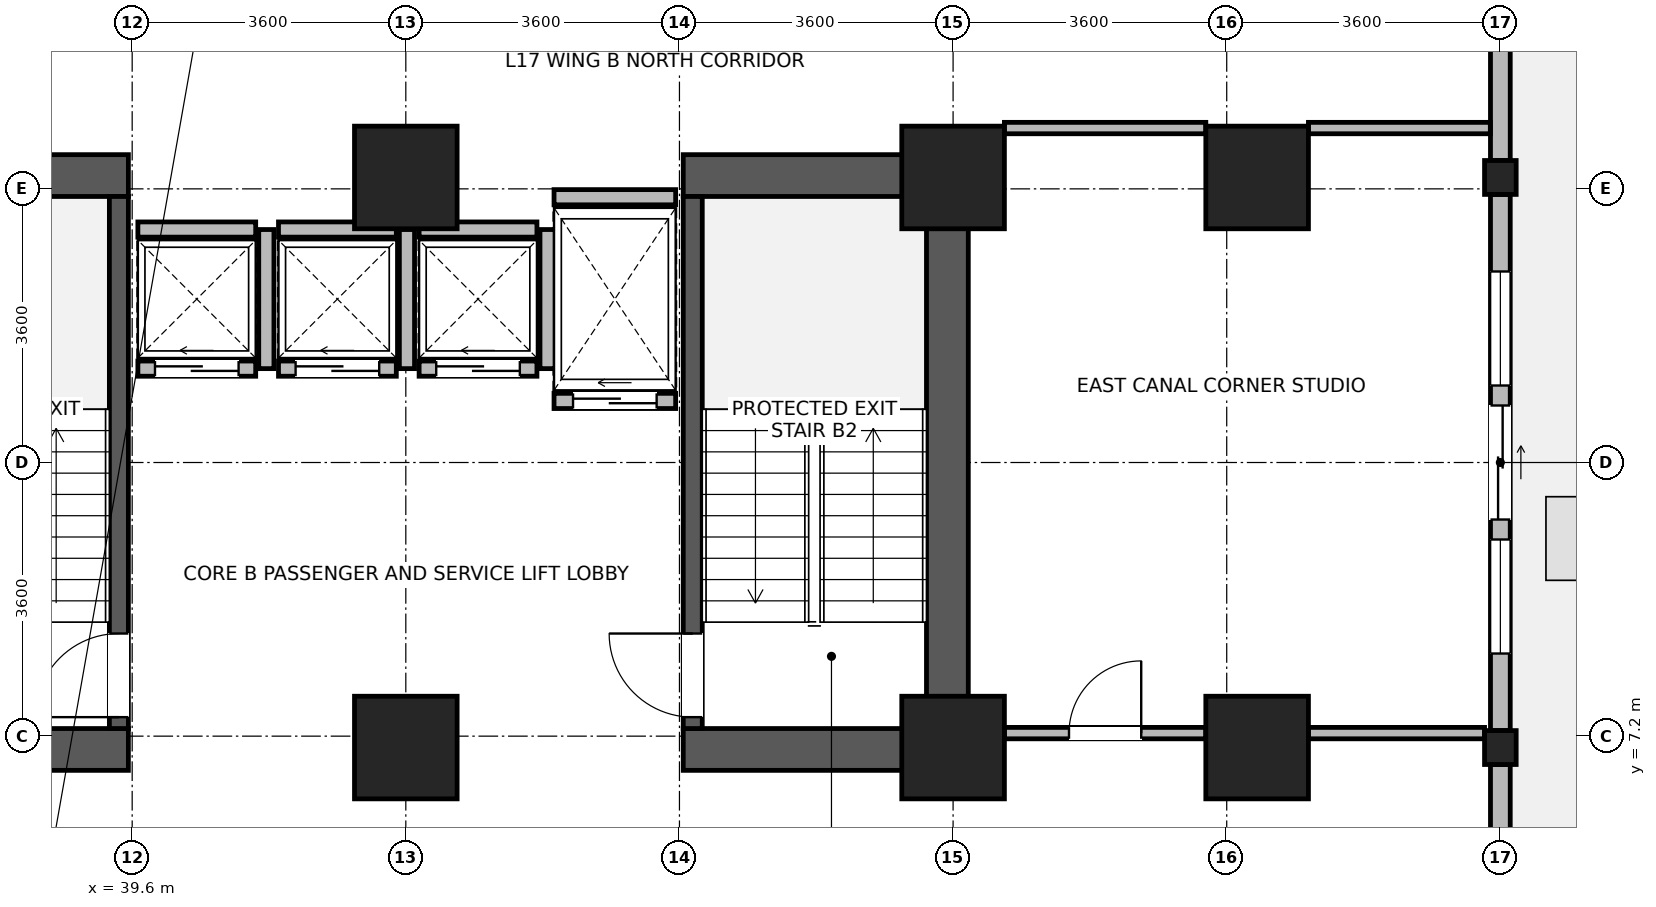
"""IFC4 building model, lengths in metres.
Left out: names, types, materials, properties, quantities, classifications, styles, units other than length and angle.
Written with IfcOpenShell. Run it as: python <this file> out.ifc"""

import sys

from ifc_helpers import new_model, si_unit, direction, frame, frame_2d, origin, origin_2d, place, context, subcontext, project, spatial, rectangle, i_section, extrude, source, transform, mapped, element, fill, save


model = new_model("IFC4")
c1 = context("Model", 3, precision=1e-05, world=origin(), true_north=direction((0.0, 1.0)))
c2 = subcontext(c1, "Body", "Model", "MODEL_VIEW")
j1 = project(units=[si_unit("LENGTHUNIT", "METRE"), si_unit("PLANEANGLEUNIT", "RADIAN")], contexts=[c1])
p1 = place(None, origin())
s1 = spatial("IfcSite", under=j1, at=p1, CompositionType="ELEMENT")
p2 = place(p1, origin())
s2 = spatial("IfcBuilding", under=s1, at=p2, CompositionType="ELEMENT")
p3 = place(p2, frame((0.0, 0.0, 69.7)))
s3 = spatial("IfcBuildingStorey", under=s2, at=p3, CompositionType="ELEMENT", Elevation=69.7)
p4 = place(p3, frame((50.325, 6.75, 0.0), z_axis=(0.0, 0.0, 1.0), x_axis=(0.0, 1.0, 0.0)))
e1 = element("IfcWall", 1, at=p4, inside=s3, PredefinedType="SHEAR", context=c2, shape_type="SweptSolid", body=[
    extrude(rectangle(XDim=8.1, YDim=0.55, at=frame_2d((4.05, 0.0))), origin(), (0.0, 0.0, 1.0), 3.34),
])
for number, where, z_axis, x_axis in (
    (2, (36.35, 7.025, 0.0), (0.0, 0.0, 1.0), (1.0, 0.0, 0.0)),
    (3, (46.85, 7.025, 0.0), (0.0, 0.0, 1.0), (1.0, 0.0, 0.0)),
    (4, (36.35, 14.575, 0.0), (0.0, 0.0, 1.0), (1.0, 0.0, 0.0)),
    (5, (46.85, 14.575, 0.0), (0.0, 0.0, 1.0), (1.0, 0.0, 0.0)),
):
    element("IfcWall", number, at=place(p3, frame(where, z_axis=z_axis, x_axis=x_axis)), inside=s3, PredefinedType="SHEAR", context=c2, shape_type="SweptSolid", body=[
        extrude(rectangle(XDim=3.2, YDim=0.55, at=frame_2d((1.6, 0.0))), origin(), (0.0, 0.0, 1.0), 3.34),
    ])
p5 = place(p3, frame((39.425, 7.3, 0.0), z_axis=(0.0, 0.0, 1.0), x_axis=(0.0, 1.0, 0.0)))
e6 = element("IfcWall", 6, at=p5, inside=s3, PredefinedType="SHEAR", context=c2, shape_type="SweptSolid", body=[
    extrude(rectangle(XDim=7.0, YDim=0.25, at=frame_2d((3.5, 0.0))), origin(), (0.0, 0.0, 1.0), 3.34),
])
p6 = place(p5, frame((0.15, 0.0, 0.0)))
e7 = element("IfcOpeningElement", 7, at=p6, cuts=e6, PredefinedType="OPENING", context=c2, shape_type="SweptSolid", body=[
    extrude(rectangle(XDim=1.1, YDim=2.08, at=frame_2d((0.55, 1.04))), frame((0.0, 0.135, 0.0), z_axis=(0.0, -1.0, 0.0), x_axis=(1.0, 0.0, 0.0)), (0.0, 0.0, 1.0), 0.27),
])
p7 = place(p3, frame((46.975, 7.3, 0.0), z_axis=(0.0, 0.0, 1.0), x_axis=(0.0, 1.0, 0.0)))
e8 = element("IfcWall", 8, at=p7, inside=s3, PredefinedType="SHEAR", context=c2, shape_type="SweptSolid", body=[
    extrude(rectangle(XDim=7.0, YDim=0.25, at=frame_2d((3.5, 0.0))), origin(), (0.0, 0.0, 1.0), 3.34),
])
p8 = place(p7, frame((0.15, 0.0, 0.0)))
e9 = element("IfcOpeningElement", 9, at=p8, cuts=e8, PredefinedType="OPENING", context=c2, shape_type="SweptSolid", body=[
    extrude(rectangle(XDim=1.1, YDim=2.08, at=frame_2d((0.55, 1.04))), frame((0.0, 0.135, 0.0), z_axis=(0.0, -1.0, 0.0), x_axis=(1.0, 0.0, 0.0)), (0.0, 0.0, 1.0), 0.27),
])
m1 = source(origin(), c2, "Body", "SweptSolid", [
    extrude(rectangle(XDim=1.35, YDim=1.35, at=origin_2d()), origin(), (0.0, 0.0, 1.0), 3.7),
])
for number, where, z_axis, x_axis in (
    (10, (43.2, 7.05, 0.0), (0.0, 0.0, 1.0), (1.0, 0.0, 0.0)),
    (11, (43.2, 14.55, 0.0), (0.0, 0.0, 1.0), (1.0, 0.0, 0.0)),
    (12, (50.4, 7.05, 0.0), (0.0, 0.0, 1.0), (1.0, 0.0, 0.0)),
    (13, (50.4, 14.55, 0.0), (0.0, 0.0, 1.0), (1.0, 0.0, 0.0)),
    (14, (54.4, 7.05, 0.0), (0.0, 0.0, 1.0), (1.0, 0.0, 0.0)),
    (15, (54.4, 14.55, 0.0), (0.0, 0.0, 1.0), (1.0, 0.0, 0.0)),
):
    element("IfcColumn", number, at=place(p3, frame(where, z_axis=z_axis, x_axis=x_axis)), inside=s3, PredefinedType="COLUMN", context=c2, shape_type="MappedRepresentation", body=[
        mapped(m1, transform((0.0, 0.0, 0.0), x_axis=(1.0, 0.0, 0.0), y_axis=(0.0, 1.0, 0.0), z_axis=(0.0, 0.0, 1.0), scale=1.0)),
    ])
m2 = source(origin(), c2, "Body", "SweptSolid", [
    extrude(i_section(OverallWidth=0.416, OverallDepth=0.446, WebThickness=0.029, FlangeThickness=0.04, FilletRadius=0.015, at=origin_2d()), origin(), (0.0, 0.0, 1.0), 3.7),
])
for number, where, z_axis, x_axis in (
    (16, (57.6, 7.05, 0.0), (0.0, 0.0, 1.0), (1.0, 0.0, 0.0)),
    (17, (57.6, 14.55, 0.0), (0.0, 0.0, 1.0), (1.0, 0.0, 0.0)),
):
    element("IfcColumn", number, at=place(p3, frame(where, z_axis=z_axis, x_axis=x_axis)), inside=s3, PredefinedType="COLUMN", context=c2, shape_type="MappedRepresentation", body=[
        mapped(m2, transform((0.0, 0.0, 0.0), x_axis=(1.0, 0.0, 0.0), y_axis=(0.0, 1.0, 0.0), z_axis=(0.0, 0.0, 1.0), scale=1.0)),
    ])
p9 = place(p3, frame((57.6, 6.826, 0.0), z_axis=(0.0, 0.0, 1.0), x_axis=(0.0, -1.0, 0.0)))
e18 = element("IfcWall", 18, at=p9, inside=s3, PredefinedType="STANDARD", context=c2, shape_type="SweptSolid", body=[
    extrude(rectangle(XDim=2.156, YDim=0.26, at=frame_2d((1.078, 0.0))), origin(), (0.0, 0.0, 1.0), 3.32),
])
p10 = place(p3, frame((57.6, 14.326, 0.0), z_axis=(0.0, 0.0, 1.0), x_axis=(0.0, -1.0, 0.0)))
e19 = element("IfcWall", 19, at=p10, inside=s3, PredefinedType="STANDARD", context=c2, shape_type="SweptSolid", body=[
    extrude(rectangle(XDim=7.052, YDim=0.26, at=frame_2d((3.526, 0.0))), origin(), (0.0, 0.0, 1.0), 2.82),
])
p11 = place(p10, frame((2.776, 0.0, 0.0)))
e20 = element("IfcOpeningElement", 20, at=p11, cuts=e19, PredefinedType="OPENING", context=c2, shape_type="SweptSolid", body=[
    extrude(rectangle(XDim=1.5, YDim=2.15, at=frame_2d((0.75, 1.075))), frame((0.0, 0.14, 0.0), z_axis=(0.0, -1.0, 0.0), x_axis=(1.0, 0.0, 0.0)), (0.0, 0.0, 1.0), 0.28),
])
p12 = place(p10, frame((1.013, 0.0, 0.85)))
e21 = element("IfcOpeningElement", 21, at=p12, cuts=e19, PredefinedType="OPENING", context=c2, shape_type="SweptSolid", body=[
    extrude(rectangle(XDim=1.5, YDim=1.85, at=frame_2d((0.75, 0.925))), frame((0.0, 0.14, 0.0), z_axis=(0.0, -1.0, 0.0), x_axis=(1.0, 0.0, 0.0)), (0.0, 0.0, 1.0), 0.28),
])
p13 = place(p10, frame((4.539, 0.0, 0.85)))
e22 = element("IfcOpeningElement", 22, at=p13, cuts=e19, PredefinedType="OPENING", context=c2, shape_type="SweptSolid", body=[
    extrude(rectangle(XDim=1.5, YDim=1.85, at=frame_2d((0.75, 0.925))), frame((0.0, 0.14, 0.0), z_axis=(0.0, -1.0, 0.0), x_axis=(1.0, 0.0, 0.0)), (0.0, 0.0, 1.0), 0.28),
])
p14 = place(p3, frame((57.6, 21.376, 0.0), z_axis=(0.0, 0.0, 1.0), x_axis=(0.0, -1.0, 0.0)))
e23 = element("IfcWall", 23, at=p14, inside=s3, PredefinedType="STANDARD", context=c2, shape_type="SweptSolid", body=[
    extrude(rectangle(XDim=6.602, YDim=0.26, at=frame_2d((3.301, 0.0))), origin(), (0.0, 0.0, 1.0), 2.82),
])
p15 = place(p14, frame((0.9, 0.0, 0.85)))
e24 = element("IfcOpeningElement", 24, at=p15, cuts=e23, PredefinedType="OPENING", context=c2, shape_type="SweptSolid", body=[
    extrude(rectangle(XDim=1.5, YDim=1.85, at=frame_2d((0.75, 0.925))), frame((0.0, 0.14, 0.0), z_axis=(0.0, -1.0, 0.0), x_axis=(1.0, 0.0, 0.0)), (0.0, 0.0, 1.0), 0.28),
])
p16 = place(p14, frame((2.826, 0.0, 0.85)))
e25 = element("IfcOpeningElement", 25, at=p16, cuts=e23, PredefinedType="OPENING", context=c2, shape_type="SweptSolid", body=[
    extrude(rectangle(XDim=0.95, YDim=1.75, at=frame_2d((0.475, 0.875))), frame((0.0, 0.14, 0.0), z_axis=(0.0, -1.0, 0.0), x_axis=(1.0, 0.0, 0.0)), (0.0, 0.0, 1.0), 0.28),
])
p17 = place(p3, frame((39.675, 12.035, 0.0), z_axis=(0.0, 0.0, 1.0), x_axis=(1.0, 0.0, 0.0)))
e26 = element("IfcWall", 26, at=p17, inside=s3, PredefinedType="PARTITIONING", context=c2, shape_type="SweptSolid", body=[
    extrude(rectangle(XDim=1.55, YDim=0.2, at=frame_2d((0.775, 0.0))), origin(), (0.0, 0.0, 1.0), 3.32),
])
p18 = place(p17, frame((0.225, 0.0, 0.0)))
e27 = element("IfcOpeningElement", 27, at=p18, cuts=e26, PredefinedType="OPENING", context=c2, shape_type="SweptSolid", body=[
    extrude(rectangle(XDim=1.1, YDim=2.12, at=frame_2d((0.55, 1.06))), frame((0.0, 0.11, 0.0), z_axis=(0.0, -1.0, 0.0), x_axis=(1.0, 0.0, 0.0)), (0.0, 0.0, 1.0), 0.22),
])
p19 = place(p3, frame((39.675, 13.865, 0.0), z_axis=(0.0, 0.0, 1.0), x_axis=(1.0, 0.0, 0.0)))
e28 = element("IfcWall", 28, at=p19, inside=s3, PredefinedType="PARTITIONING", context=c2, shape_type="SweptSolid", body=[
    extrude(rectangle(XDim=1.55, YDim=0.2, at=frame_2d((0.775, 0.0))), origin(), (0.0, 0.0, 1.0), 3.32),
])
p20 = place(p3, frame((41.365, 12.035, 0.0), z_axis=(0.0, 0.0, 1.0), x_axis=(0.0, 1.0, 0.0)))
e29 = element("IfcWall", 29, at=p20, inside=s3, PredefinedType="PARTITIONING", context=c2, shape_type="SweptSolid", body=[
    extrude(rectangle(XDim=1.83, YDim=0.2, at=frame_2d((0.915, 0.0))), origin(), (0.0, 0.0, 1.0), 3.32),
])
p21 = place(p3, frame((41.525, 12.035, 0.0), z_axis=(0.0, 0.0, 1.0), x_axis=(1.0, 0.0, 0.0)))
e30 = element("IfcWall", 30, at=p21, inside=s3, PredefinedType="PARTITIONING", context=c2, shape_type="SweptSolid", body=[
    extrude(rectangle(XDim=1.55, YDim=0.2, at=frame_2d((0.775, 0.0))), origin(), (0.0, 0.0, 1.0), 3.32),
])
p22 = place(p21, frame((0.225, 0.0, 0.0)))
e31 = element("IfcOpeningElement", 31, at=p22, cuts=e30, PredefinedType="OPENING", context=c2, shape_type="SweptSolid", body=[
    extrude(rectangle(XDim=1.1, YDim=2.12, at=frame_2d((0.55, 1.06))), frame((0.0, 0.11, 0.0), z_axis=(0.0, -1.0, 0.0), x_axis=(1.0, 0.0, 0.0)), (0.0, 0.0, 1.0), 0.22),
])
p23 = place(p3, frame((41.525, 13.865, 0.0), z_axis=(0.0, 0.0, 1.0), x_axis=(1.0, 0.0, 0.0)))
e32 = element("IfcWall", 32, at=p23, inside=s3, PredefinedType="PARTITIONING", context=c2, shape_type="SweptSolid", body=[
    extrude(rectangle(XDim=1.55, YDim=0.2, at=frame_2d((0.775, 0.0))), origin(), (0.0, 0.0, 1.0), 3.32),
])
p24 = place(p3, frame((43.215, 12.035, 0.0), z_axis=(0.0, 0.0, 1.0), x_axis=(0.0, 1.0, 0.0)))
e33 = element("IfcWall", 33, at=p24, inside=s3, PredefinedType="PARTITIONING", context=c2, shape_type="SweptSolid", body=[
    extrude(rectangle(XDim=1.83, YDim=0.2, at=frame_2d((0.915, 0.0))), origin(), (0.0, 0.0, 1.0), 3.32),
])
p25 = place(p3, frame((43.375, 12.035, 0.0), z_axis=(0.0, 0.0, 1.0), x_axis=(1.0, 0.0, 0.0)))
e34 = element("IfcWall", 34, at=p25, inside=s3, PredefinedType="PARTITIONING", context=c2, shape_type="SweptSolid", body=[
    extrude(rectangle(XDim=1.55, YDim=0.2, at=frame_2d((0.775, 0.0))), origin(), (0.0, 0.0, 1.0), 3.32),
])
p26 = place(p25, frame((0.225, 0.0, 0.0)))
e35 = element("IfcOpeningElement", 35, at=p26, cuts=e34, PredefinedType="OPENING", context=c2, shape_type="SweptSolid", body=[
    extrude(rectangle(XDim=1.1, YDim=2.12, at=frame_2d((0.55, 1.06))), frame((0.0, 0.11, 0.0), z_axis=(0.0, -1.0, 0.0), x_axis=(1.0, 0.0, 0.0)), (0.0, 0.0, 1.0), 0.22),
])
p27 = place(p3, frame((43.375, 13.865, 0.0), z_axis=(0.0, 0.0, 1.0), x_axis=(1.0, 0.0, 0.0)))
e36 = element("IfcWall", 36, at=p27, inside=s3, PredefinedType="PARTITIONING", context=c2, shape_type="SweptSolid", body=[
    extrude(rectangle(XDim=1.55, YDim=0.2, at=frame_2d((0.775, 0.0))), origin(), (0.0, 0.0, 1.0), 3.32),
])
p28 = place(p3, frame((45.065, 12.035, 0.0), z_axis=(0.0, 0.0, 1.0), x_axis=(0.0, 1.0, 0.0)))
e37 = element("IfcWall", 37, at=p28, inside=s3, PredefinedType="PARTITIONING", context=c2, shape_type="SweptSolid", body=[
    extrude(rectangle(XDim=1.83, YDim=0.2, at=frame_2d((0.915, 0.0))), origin(), (0.0, 0.0, 1.0), 3.32),
])
p29 = place(p3, frame((45.15, 11.61, 0.0), z_axis=(0.0, 0.0, 1.0), x_axis=(1.0, 0.0, 0.0)))
e38 = element("IfcWall", 38, at=p29, inside=s3, PredefinedType="PARTITIONING", context=c2, shape_type="SweptSolid", body=[
    extrude(rectangle(XDim=1.6, YDim=0.2, at=frame_2d((0.8, 0.0))), origin(), (0.0, 0.0, 1.0), 3.32),
])
p30 = place(p29, frame((0.25, 0.0, 0.0)))
e39 = element("IfcOpeningElement", 39, at=p30, cuts=e38, PredefinedType="OPENING", context=c2, shape_type="SweptSolid", body=[
    extrude(rectangle(XDim=1.1, YDim=2.12, at=frame_2d((0.55, 1.06))), frame((0.0, 0.11, 0.0), z_axis=(0.0, -1.0, 0.0), x_axis=(1.0, 0.0, 0.0)), (0.0, 0.0, 1.0), 0.22),
])
p31 = place(p3, frame((45.15, 14.29, 0.0), z_axis=(0.0, 0.0, 1.0), x_axis=(1.0, 0.0, 0.0)))
e40 = element("IfcWall", 40, at=p31, inside=s3, PredefinedType="PARTITIONING", context=c2, shape_type="SweptSolid", body=[
    extrude(rectangle(XDim=1.6, YDim=0.2, at=frame_2d((0.8, 0.0))), origin(), (0.0, 0.0, 1.0), 2.12),
])
p32 = place(p3, frame((51.075, 7.24, 0.0), z_axis=(0.0, 0.0, 1.0), x_axis=(1.0, 0.0, 0.0)))
e41 = element("IfcWall", 41, at=p32, inside=s3, PredefinedType="PARTITIONING", context=c2, shape_type="SweptSolid", body=[
    extrude(rectangle(XDim=2.65, YDim=0.15, at=frame_2d((1.325, 0.0))), origin(), (0.0, 0.0, 1.0), 2.67),
])
p33 = place(p32, frame((0.85, 0.0, 0.0)))
e42 = element("IfcOpeningElement", 42, at=p33, cuts=e41, PredefinedType="OPENING", context=c2, shape_type="SweptSolid", body=[
    extrude(rectangle(XDim=0.95, YDim=2.1, at=frame_2d((0.475, 1.05))), frame((0.0, 0.085, 0.0), z_axis=(0.0, -1.0, 0.0), x_axis=(1.0, 0.0, 0.0)), (0.0, 0.0, 1.0), 0.17),
])
p34 = place(p3, frame((55.075, 7.24, 0.0), z_axis=(0.0, 0.0, 1.0), x_axis=(1.0, 0.0, 0.0)))
e43 = element("IfcWall", 43, at=p34, inside=s3, PredefinedType="PARTITIONING", context=c2, shape_type="SweptSolid", body=[
    extrude(rectangle(XDim=2.317, YDim=0.15, at=frame_2d((1.159, 0.0))), origin(), (0.0, 0.0, 1.0), 2.67),
])
p35 = place(p3, frame((51.075, 15.2, 0.0), z_axis=(0.0, 0.0, 1.0), x_axis=(1.0, 0.0, 0.0)))
e44 = element("IfcWall", 44, at=p35, inside=s3, PredefinedType="PARTITIONING", context=c2, shape_type="SweptSolid", body=[
    extrude(rectangle(XDim=2.65, YDim=0.15, at=frame_2d((1.325, 0.0))), origin(), (0.0, 0.0, 1.0), 3.32),
])
p36 = place(p3, frame((55.075, 15.2, 0.0), z_axis=(0.0, 0.0, 1.0), x_axis=(1.0, 0.0, 0.0)))
e45 = element("IfcWall", 45, at=p36, inside=s3, PredefinedType="PARTITIONING", context=c2, shape_type="SweptSolid", body=[
    extrude(rectangle(XDim=2.393, YDim=0.15, at=frame_2d((1.197, 0.0))), origin(), (0.0, 0.0, 1.0), 3.32),
])
p37 = place(p11, origin())
e46 = element("IfcDoor", 46, at=p37, inside=s3, OperationType="SLIDING_TO_LEFT", PredefinedType="DOOR", context=c2, shape_type="SweptSolid", body=[
    extrude(rectangle(XDim=1.5, YDim=2.15, at=frame_2d((0.75, 1.075))), frame((0.0, 0.025, 0.0), z_axis=(0.0, -1.0, 0.0), x_axis=(1.0, 0.0, 0.0)), (0.0, 0.0, 1.0), 0.05),
])
fill(e20, e46)
p38 = place(p12, origin())
e47 = element("IfcWindow", 47, at=p38, inside=s3, PartitioningType="SINGLE_PANEL", PredefinedType="WINDOW", context=c2, shape_type="SweptSolid", body=[
    extrude(rectangle(XDim=1.5, YDim=1.85, at=frame_2d((0.75, 0.925))), frame((0.0, 0.03, 0.0), z_axis=(0.0, -1.0, 0.0), x_axis=(1.0, 0.0, 0.0)), (0.0, 0.0, 1.0), 0.06),
])
fill(e21, e47)
p39 = place(p13, origin())
e48 = element("IfcWindow", 48, at=p39, inside=s3, PartitioningType="SINGLE_PANEL", PredefinedType="WINDOW", context=c2, shape_type="SweptSolid", body=[
    extrude(rectangle(XDim=1.5, YDim=1.85, at=frame_2d((0.75, 0.925))), frame((0.0, 0.03, 0.0), z_axis=(0.0, -1.0, 0.0), x_axis=(1.0, 0.0, 0.0)), (0.0, 0.0, 1.0), 0.06),
])
fill(e22, e48)
p40 = place(p6, origin())
e49 = element("IfcDoor", 49, at=p40, inside=s3, OperationType="SINGLE_SWING_LEFT", PredefinedType="DOOR", context=c2, shape_type="SweptSolid", body=[
    extrude(rectangle(XDim=1.1, YDim=2.08, at=frame_2d((0.55, 1.04))), frame((0.0, 0.025, 0.0), z_axis=(0.0, -1.0, 0.0), x_axis=(1.0, 0.0, 0.0)), (0.0, 0.0, 1.0), 0.05),
])
fill(e7, e49)
p41 = place(p8, origin())
e50 = element("IfcDoor", 50, at=p41, inside=s3, OperationType="SINGLE_SWING_RIGHT", PredefinedType="DOOR", context=c2, shape_type="SweptSolid", body=[
    extrude(rectangle(XDim=1.1, YDim=2.08, at=frame_2d((0.55, 1.04))), frame((0.0, 0.025, 0.0), z_axis=(0.0, -1.0, 0.0), x_axis=(1.0, 0.0, 0.0)), (0.0, 0.0, 1.0), 0.05),
])
fill(e9, e50)
p42 = place(p18, origin())
e51 = element("IfcDoor", 51, at=p42, inside=s3, OperationType="SLIDING_TO_LEFT", PredefinedType="DOOR", context=c2, shape_type="SweptSolid", body=[
    extrude(rectangle(XDim=1.1, YDim=2.12, at=frame_2d((0.55, 1.06))), frame((0.0, 0.025, 0.0), z_axis=(0.0, -1.0, 0.0), x_axis=(1.0, 0.0, 0.0)), (0.0, 0.0, 1.0), 0.05),
])
fill(e27, e51)
p43 = place(p22, origin())
e52 = element("IfcDoor", 52, at=p43, inside=s3, OperationType="SLIDING_TO_LEFT", PredefinedType="DOOR", context=c2, shape_type="SweptSolid", body=[
    extrude(rectangle(XDim=1.1, YDim=2.12, at=frame_2d((0.55, 1.06))), frame((0.0, 0.025, 0.0), z_axis=(0.0, -1.0, 0.0), x_axis=(1.0, 0.0, 0.0)), (0.0, 0.0, 1.0), 0.05),
])
fill(e31, e52)
p44 = place(p26, origin())
e53 = element("IfcDoor", 53, at=p44, inside=s3, OperationType="SLIDING_TO_LEFT", PredefinedType="DOOR", context=c2, shape_type="SweptSolid", body=[
    extrude(rectangle(XDim=1.1, YDim=2.12, at=frame_2d((0.55, 1.06))), frame((0.0, 0.025, 0.0), z_axis=(0.0, -1.0, 0.0), x_axis=(1.0, 0.0, 0.0)), (0.0, 0.0, 1.0), 0.05),
])
fill(e35, e53)
p45 = place(p30, origin())
e54 = element("IfcDoor", 54, at=p45, inside=s3, OperationType="SLIDING_TO_LEFT", PredefinedType="DOOR", context=c2, shape_type="SweptSolid", body=[
    extrude(rectangle(XDim=1.1, YDim=2.12, at=frame_2d((0.55, 1.06))), frame((0.0, 0.025, 0.0), z_axis=(0.0, -1.0, 0.0), x_axis=(1.0, 0.0, 0.0)), (0.0, 0.0, 1.0), 0.05),
])
fill(e39, e54)
p46 = place(p33, origin())
e55 = element("IfcDoor", 55, at=p46, inside=s3, OperationType="SINGLE_SWING_RIGHT", PredefinedType="DOOR", context=c2, shape_type="SweptSolid", body=[
    extrude(rectangle(XDim=0.95, YDim=2.1, at=frame_2d((0.475, 1.05))), frame((0.0, 0.025, 0.0), z_axis=(0.0, -1.0, 0.0), x_axis=(1.0, 0.0, 0.0)), (0.0, 0.0, 1.0), 0.05),
])
fill(e42, e55)
save(model, sys.argv[1])
